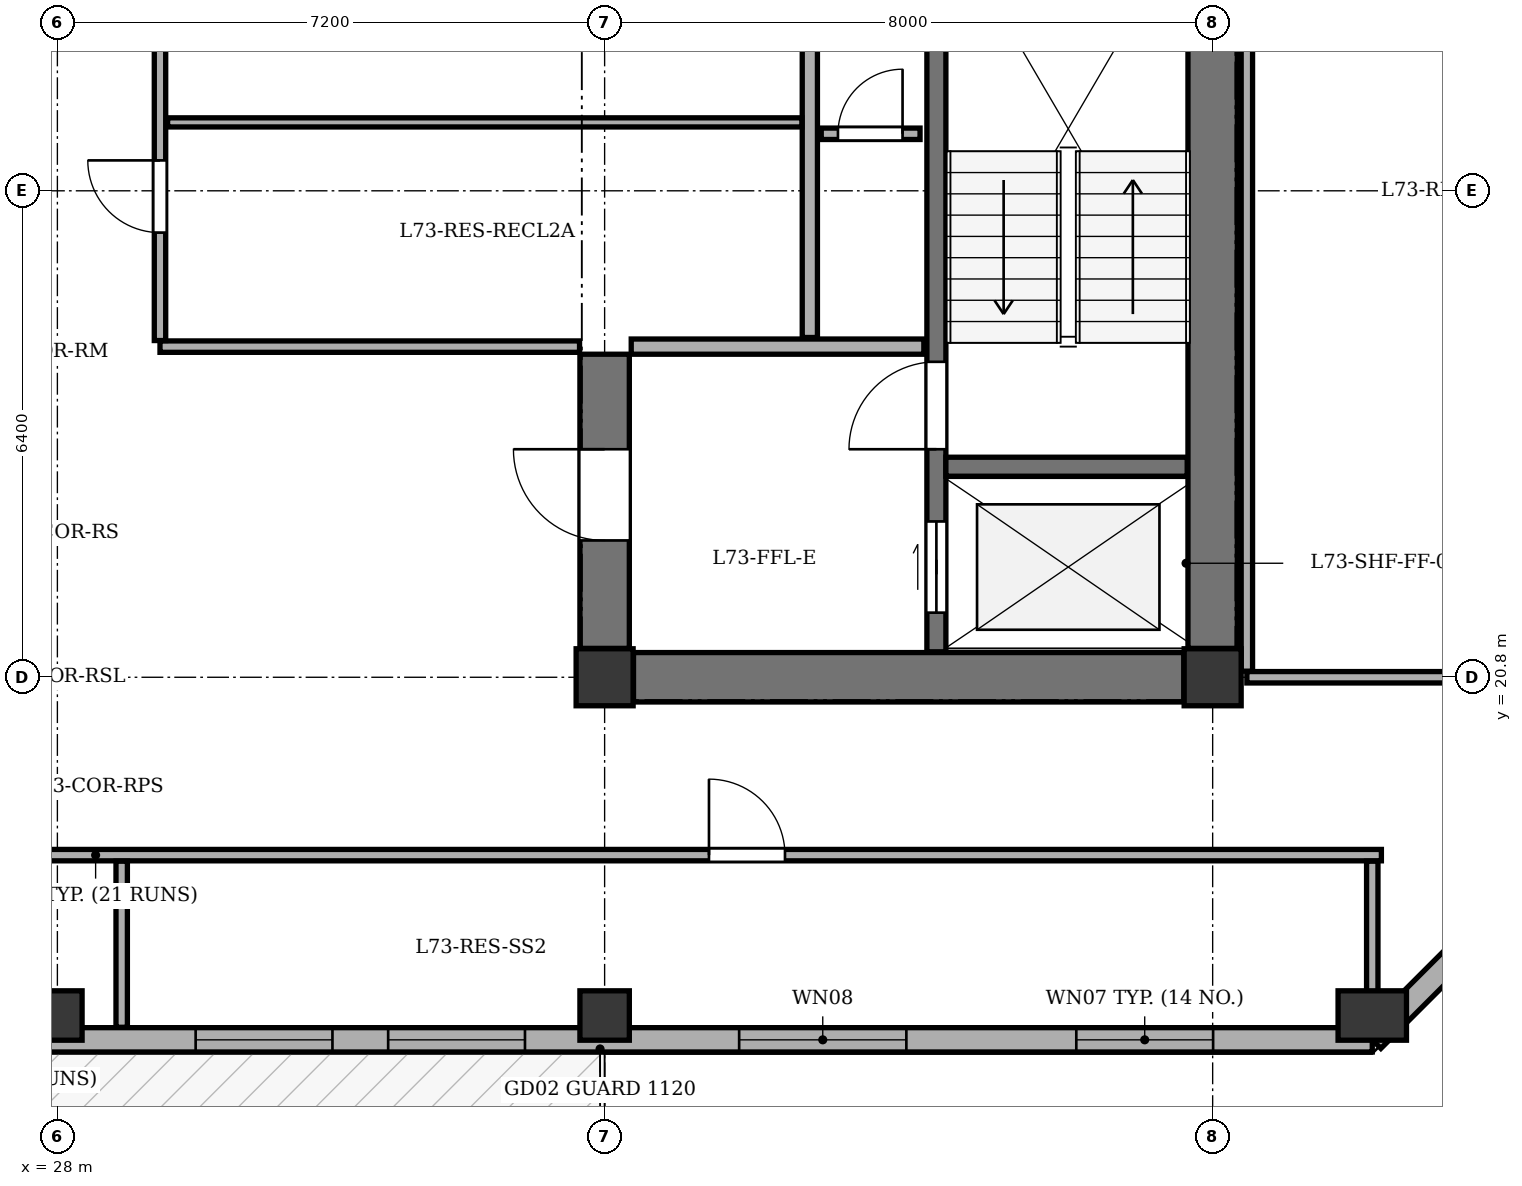
"""IFC4 building model, lengths in metres.
Left out: names, types, materials, properties, quantities, classifications, styles, units other than length and angle.
Written with IfcOpenShell. Run it as: python <this file> out.ifc"""

import sys

from ifc_helpers import new_model, si_unit, direction, frame, frame_2d, origin, origin_2d, place, context, subcontext, project, spatial, rectangle, extrude, element, fill, save


model = new_model("IFC4")
c1 = context("Model", 3, precision=1e-05, world=origin(), true_north=direction((0.0, 1.0)))
c2 = subcontext(c1, "Body", "Model", "MODEL_VIEW")
j1 = project(units=[si_unit("LENGTHUNIT", "METRE"), si_unit("PLANEANGLEUNIT", "RADIAN")], contexts=[c1])
p1 = place(None, origin())
s1 = spatial("IfcSite", under=j1, at=p1, CompositionType="ELEMENT")
p2 = place(p1, origin())
s2 = spatial("IfcBuilding", under=s1, at=p2, CompositionType="ELEMENT")
p3 = place(p2, frame((0.0, 0.0, 275.5)))
s3 = spatial("IfcBuildingStorey", under=s2, at=p3, CompositionType="ELEMENT", Elevation=275.5)
for number, where, z_axis, x_axis in (
    (1, (35.2, 20.8, 0.0), (0.0, 0.0, 1.0), (1.0, 0.0, 0.0)),
    (2, (43.2, 20.8, 0.0), (0.0, 0.0, 1.0), (1.0, 0.0, 0.0)),
):
    element("IfcColumn", number, at=place(p3, frame(where, z_axis=z_axis, x_axis=x_axis)), inside=s3, PredefinedType="COLUMN", context=c2, shape_type="SweptSolid", body=[
        extrude(rectangle(XDim=0.75, YDim=0.75, at=origin_2d()), origin(), (0.0, 0.0, 1.0), 3.4),
    ])
for number, where, z_axis, x_axis in (
    (3, (28.0, 16.35, 0.0), (0.0, 0.0, 1.0), (1.0, 0.0, 0.0)),
    (4, (35.2, 16.35, 0.0), (0.0, 0.0, 1.0), (1.0, 0.0, 0.0)),
):
    element("IfcColumn", number, at=place(p3, frame(where, z_axis=z_axis, x_axis=x_axis)), inside=s3, PredefinedType="COLUMN", context=c2, shape_type="SweptSolid", body=[
        extrude(rectangle(XDim=0.65, YDim=0.65, at=origin_2d()), origin(), (0.0, 0.0, 1.0), 3.4),
    ])
p4 = place(p3, frame((45.3, 16.35, 0.0), z_axis=(0.0, 0.0, 1.0), x_axis=(1.0, 0.0, 0.0)))
e5 = element("IfcColumn", 5, at=p4, inside=s3, PredefinedType="COLUMN", context=c2, shape_type="SweptSolid", body=[
    extrude(rectangle(XDim=0.65, YDim=0.9, at=origin_2d()), origin(), (0.0, 0.0, 1.0), 3.4),
])
p5 = place(p3, frame((45.3, 16.03, 0.0), z_axis=(0.0, 0.0, 1.0), x_axis=(-1.0, 0.0, 0.0)))
e6 = element("IfcWall", 6, at=p5, inside=s3, PredefinedType="STANDARD", context=c2, shape_type="SweptSolid", body=[
    extrude(rectangle(XDim=37.0, YDim=0.32, at=frame_2d((18.5, 0.0))), origin(), (0.0, 0.0, 1.0), 2.725),
])
p6 = place(p5, frame((20.6, 0.0, 0.0)))
e7 = element("IfcOpeningElement", 7, at=p6, cuts=e6, PredefinedType="OPENING", context=c2, shape_type="SweptSolid", body=[
    extrude(rectangle(XDim=1.0, YDim=2.02, at=frame_2d((0.5, 1.01))), frame((0.0, 0.17, 0.0), z_axis=(0.0, -1.0, 0.0), x_axis=(1.0, 0.0, 0.0)), (0.0, 0.0, 1.0), 0.34),
])
p7 = place(p5, frame((2.094, 0.0, 0.75)))
e8 = element("IfcOpeningElement", 8, at=p7, cuts=e6, PredefinedType="OPENING", context=c2, shape_type="SweptSolid", body=[
    extrude(rectangle(XDim=1.8, YDim=1.7, at=frame_2d((0.9, 0.85))), frame((0.0, 0.17, 0.0), z_axis=(0.0, -1.0, 0.0), x_axis=(1.0, 0.0, 0.0)), (0.0, 0.0, 1.0), 0.34),
])
p8 = place(p5, frame((6.13, 0.0, 0.75)))
e9 = element("IfcOpeningElement", 9, at=p8, cuts=e6, PredefinedType="OPENING", context=c2, shape_type="SweptSolid", body=[
    extrude(rectangle(XDim=2.2, YDim=1.7, at=frame_2d((1.1, 0.85))), frame((0.0, 0.17, 0.0), z_axis=(0.0, -1.0, 0.0), x_axis=(1.0, 0.0, 0.0)), (0.0, 0.0, 1.0), 0.34),
])
p9 = place(p5, frame((11.148, 0.0, 0.75)))
e10 = element("IfcOpeningElement", 10, at=p9, cuts=e6, PredefinedType="OPENING", context=c2, shape_type="SweptSolid", body=[
    extrude(rectangle(XDim=1.8, YDim=1.7, at=frame_2d((0.9, 0.85))), frame((0.0, 0.17, 0.0), z_axis=(0.0, -1.0, 0.0), x_axis=(1.0, 0.0, 0.0)), (0.0, 0.0, 1.0), 0.34),
])
p10 = place(p5, frame((13.681, 0.0, 0.75)))
e11 = element("IfcOpeningElement", 11, at=p10, cuts=e6, PredefinedType="OPENING", context=c2, shape_type="SweptSolid", body=[
    extrude(rectangle(XDim=1.8, YDim=1.7, at=frame_2d((0.9, 0.85))), frame((0.0, 0.17, 0.0), z_axis=(0.0, -1.0, 0.0), x_axis=(1.0, 0.0, 0.0)), (0.0, 0.0, 1.0), 0.34),
])
p11 = place(p5, frame((26.438, 0.0, 0.75)))
e12 = element("IfcOpeningElement", 12, at=p11, cuts=e6, PredefinedType="OPENING", context=c2, shape_type="SweptSolid", body=[
    extrude(rectangle(XDim=1.8, YDim=1.7, at=frame_2d((0.9, 0.85))), frame((0.0, 0.17, 0.0), z_axis=(0.0, -1.0, 0.0), x_axis=(1.0, 0.0, 0.0)), (0.0, 0.0, 1.0), 0.34),
])
p12 = place(p5, frame((30.417, 0.0, 0.75)))
e13 = element("IfcOpeningElement", 13, at=p12, cuts=e6, PredefinedType="OPENING", context=c2, shape_type="SweptSolid", body=[
    extrude(rectangle(XDim=2.2, YDim=1.7, at=frame_2d((1.1, 0.85))), frame((0.0, 0.17, 0.0), z_axis=(0.0, -1.0, 0.0), x_axis=(1.0, 0.0, 0.0)), (0.0, 0.0, 1.0), 0.34),
])
p13 = place(p3, frame((49.12, 19.85, 0.0), z_axis=(0.0, 0.0, 1.0), x_axis=(-0.707106781187, -0.707106781187, 0.0)))
e14 = element("IfcWall", 14, at=p13, inside=s3, PredefinedType="STANDARD", context=c2, shape_type="SweptSolid", body=[
    extrude(rectangle(XDim=5.402, YDim=0.32, at=frame_2d((2.701, 0.0))), origin(), (0.0, 0.0, 1.0), 2.725),
])
p14 = place(p13, frame((2.001, 0.0, 0.75)))
e15 = element("IfcOpeningElement", 15, at=p14, cuts=e14, PredefinedType="OPENING", context=c2, shape_type="SweptSolid", body=[
    extrude(rectangle(XDim=1.4, YDim=1.65, at=frame_2d((0.7, 0.825))), frame((0.0, 0.17, 0.0), z_axis=(0.0, -1.0, 0.0), x_axis=(1.0, 0.0, 0.0)), (0.0, 0.0, 1.0), 0.34),
])
p15 = place(p3, frame((43.2, 21.18, 0.0), z_axis=(0.0, 0.0, 1.0), x_axis=(0.0, 1.0, 0.0)))
e16 = element("IfcWall", 16, at=p15, inside=s3, PredefinedType="SHEAR", context=c2, shape_type="SweptSolid", body=[
    extrude(rectangle(XDim=12.04, YDim=0.65, at=frame_2d((6.02, 0.0))), origin(), (0.0, 0.0, 1.0), 3.1),
])
p16 = place(p3, frame((35.58, 20.8, 0.0), z_axis=(0.0, 0.0, 1.0), x_axis=(1.0, 0.0, 0.0)))
e17 = element("IfcWall", 17, at=p16, inside=s3, PredefinedType="SHEAR", context=c2, shape_type="SweptSolid", body=[
    extrude(rectangle(XDim=7.24, YDim=0.65, at=frame_2d((3.62, 0.0))), origin(), (0.0, 0.0, 1.0), 3.1),
])
p17 = place(p3, frame((35.2, 21.18, 0.0), z_axis=(0.0, 0.0, 1.0), x_axis=(0.0, 1.0, 0.0)))
e18 = element("IfcWall", 18, at=p17, inside=s3, PredefinedType="SHEAR", context=c2, shape_type="SweptSolid", body=[
    extrude(rectangle(XDim=3.87, YDim=0.65, at=frame_2d((1.935, 0.0))), origin(), (0.0, 0.0, 1.0), 3.1),
])
p18 = place(p17, frame((1.42, 0.0, 0.0)))
e19 = element("IfcOpeningElement", 19, at=p18, cuts=e18, PredefinedType="OPENING", context=c2, shape_type="SweptSolid", body=[
    extrude(rectangle(XDim=1.2, YDim=2.15, at=frame_2d((0.6, 1.075))), frame((0.0, 0.335, 0.0), z_axis=(0.0, -1.0, 0.0), x_axis=(1.0, 0.0, 0.0)), (0.0, 0.0, 1.0), 0.67),
])
p19 = place(p3, frame((39.565, 21.135, 0.0), z_axis=(0.0, 0.0, 1.0), x_axis=(0.0, 1.0, 0.0)))
e20 = element("IfcWall", 20, at=p19, inside=s3, PredefinedType="SHEAR", context=c2, shape_type="SweptSolid", body=[
    extrude(rectangle(XDim=12.13, YDim=0.25, at=frame_2d((6.065, 0.0))), origin(), (0.0, 0.0, 1.0), 3.1),
])
p20 = place(p19, frame((0.515, 0.0, 0.0)))
e21 = element("IfcOpeningElement", 21, at=p20, cuts=e20, PredefinedType="OPENING", context=c2, shape_type="SweptSolid", body=[
    extrude(rectangle(XDim=1.2, YDim=2.15, at=frame_2d((0.6, 1.075))), frame((0.0, 0.135, 0.0), z_axis=(0.0, -1.0, 0.0), x_axis=(1.0, 0.0, 0.0)), (0.0, 0.0, 1.0), 0.27),
])
p21 = place(p19, frame((2.665, 0.0, 0.0)))
e22 = element("IfcOpeningElement", 22, at=p21, cuts=e20, PredefinedType="OPENING", context=c2, shape_type="SweptSolid", body=[
    extrude(rectangle(XDim=1.15, YDim=2.15, at=frame_2d((0.575, 1.075))), frame((0.0, 0.135, 0.0), z_axis=(0.0, -1.0, 0.0), x_axis=(1.0, 0.0, 0.0)), (0.0, 0.0, 1.0), 0.27),
])
p22 = place(p3, frame((39.69, 23.57, 0.0), z_axis=(0.0, 0.0, 1.0), x_axis=(1.0, 0.0, 0.0)))
e23 = element("IfcWall", 23, at=p22, inside=s3, PredefinedType="SHEAR", context=c2, shape_type="SweptSolid", body=[
    extrude(rectangle(XDim=3.175, YDim=0.25, at=frame_2d((1.587, 0.0))), origin(), (0.0, 0.0, 1.0), 3.1),
])
p23 = place(p3, frame((35.55, 25.15, 0.0), z_axis=(0.0, 0.0, 1.0), x_axis=(1.0, 0.0, 0.0)))
e24 = element("IfcWall", 24, at=p23, inside=s3, PredefinedType="SOLIDWALL", context=c2, shape_type="SweptSolid", body=[
    extrude(rectangle(XDim=3.85, YDim=0.2, at=frame_2d((1.925, 0.0))), origin(), (0.0, 0.0, 1.0), 3.1),
])
p24 = place(p3, frame((37.9, 25.27, 0.0), z_axis=(0.0, 0.0, 1.0), x_axis=(0.0, 1.0, 0.0)))
e25 = element("IfcWall", 25, at=p24, inside=s3, PredefinedType="SOLIDWALL", context=c2, shape_type="SweptSolid", body=[
    extrude(rectangle(XDim=7.995, YDim=0.2, at=frame_2d((3.998, 0.0))), origin(), (0.0, 0.0, 1.0), 3.1),
])
p25 = place(p3, frame((38.05, 27.95, 0.0), z_axis=(0.0, 0.0, 1.0), x_axis=(1.0, 0.0, 0.0)))
e26 = element("IfcWall", 26, at=p25, inside=s3, PredefinedType="PARTITIONING", context=c2, shape_type="SweptSolid", body=[
    extrude(rectangle(XDim=1.3, YDim=0.15, at=frame_2d((0.65, 0.0))), origin(), (0.0, 0.0, 1.0), 3.1),
])
p26 = place(p25, frame((0.22, 0.0, 0.0)))
e27 = element("IfcOpeningElement", 27, at=p26, cuts=e26, PredefinedType="OPENING", context=c2, shape_type="SweptSolid", body=[
    extrude(rectangle(XDim=0.85, YDim=2.02, at=frame_2d((0.425, 1.01))), frame((0.0, 0.085, 0.0), z_axis=(0.0, -1.0, 0.0), x_axis=(1.0, 0.0, 0.0)), (0.0, 0.0, 1.0), 0.17),
])
p27 = place(p3, frame((29.35, 25.15, 0.0), z_axis=(0.0, 0.0, 1.0), x_axis=(1.0, 0.0, 0.0)))
e28 = element("IfcWall", 28, at=p27, inside=s3, PredefinedType="PARTITIONING", context=c2, shape_type="SweptSolid", body=[
    extrude(rectangle(XDim=5.52, YDim=0.15, at=frame_2d((2.76, 0.0))), origin(), (0.0, 0.0, 1.0), 3.1),
])
p28 = place(p3, frame((29.35, 25.23, 0.0), z_axis=(0.0, 0.0, 1.0), x_axis=(0.0, 1.0, 0.0)))
e29 = element("IfcWall", 29, at=p28, inside=s3, PredefinedType="PARTITIONING", context=c2, shape_type="SweptSolid", body=[
    extrude(rectangle(XDim=5.82, YDim=0.15, at=frame_2d((2.91, 0.0))), origin(), (0.0, 0.0, 1.0), 3.1),
])
p29 = place(p28, frame((1.42, 0.0, 0.0)))
e30 = element("IfcOpeningElement", 30, at=p29, cuts=e29, PredefinedType="OPENING", context=c2, shape_type="SweptSolid", body=[
    extrude(rectangle(XDim=0.95, YDim=2.1, at=frame_2d((0.475, 1.05))), frame((0.0, 0.085, 0.0), z_axis=(0.0, -1.0, 0.0), x_axis=(1.0, 0.0, 0.0)), (0.0, 0.0, 1.0), 0.17),
])
p30 = place(p28, frame((4.32, 0.0, 0.0)))
e31 = element("IfcOpeningElement", 31, at=p30, cuts=e29, PredefinedType="OPENING", context=c2, shape_type="SweptSolid", body=[
    extrude(rectangle(XDim=0.95, YDim=2.1, at=frame_2d((0.475, 1.05))), frame((0.0, 0.085, 0.0), z_axis=(0.0, -1.0, 0.0), x_axis=(1.0, 0.0, 0.0)), (0.0, 0.0, 1.0), 0.17),
])
p31 = place(p3, frame((29.45, 28.1, 0.0), z_axis=(0.0, 0.0, 1.0), x_axis=(1.0, 0.0, 0.0)))
e32 = element("IfcWall", 32, at=p31, inside=s3, PredefinedType="PARTITIONING", context=c2, shape_type="SweptSolid", body=[
    extrude(rectangle(XDim=8.345, YDim=0.12, at=frame_2d((4.172, 0.0))), origin(), (0.0, 0.0, 1.0), 3.1),
])
p32 = place(p3, frame((10.9, 18.46, 0.0), z_axis=(0.0, 0.0, 1.0), x_axis=(1.0, 0.0, 0.0)))
e33 = element("IfcWall", 33, at=p32, inside=s3, PredefinedType="PARTITIONING", context=c2, shape_type="SweptSolid", body=[
    extrude(rectangle(XDim=34.52, YDim=0.15, at=frame_2d((17.26, 0.0))), origin(), (0.0, 0.0, 1.0), 3.1),
])
p33 = place(p32, frame((8.533, 0.0, 0.0)))
e34 = element("IfcOpeningElement", 34, at=p33, cuts=e33, PredefinedType="OPENING", context=c2, shape_type="SweptSolid", body=[
    extrude(rectangle(XDim=1.0, YDim=2.1, at=frame_2d((0.5, 1.05))), frame((0.0, 0.085, 0.0), z_axis=(0.0, -1.0, 0.0), x_axis=(1.0, 0.0, 0.0)), (0.0, 0.0, 1.0), 0.17),
])
p34 = place(p32, frame((25.673, 0.0, 0.0)))
e35 = element("IfcOpeningElement", 35, at=p34, cuts=e33, PredefinedType="OPENING", context=c2, shape_type="SweptSolid", body=[
    extrude(rectangle(XDim=1.0, YDim=2.1, at=frame_2d((0.5, 1.05))), frame((0.0, 0.085, 0.0), z_axis=(0.0, -1.0, 0.0), x_axis=(1.0, 0.0, 0.0)), (0.0, 0.0, 1.0), 0.17),
])
for number, where, z_axis, x_axis in (
    (36, (28.846, 16.195, 0.0), (0.0, 0.0, 1.0), (0.0, 1.0, 0.0)),
    (37, (45.3, 16.195, 0.0), (0.0, 0.0, 1.0), (0.0, 1.0, 0.0)),
):
    element("IfcWall", number, at=place(p3, frame(where, z_axis=z_axis, x_axis=x_axis)), inside=s3, PredefinedType="PARTITIONING", context=c2, shape_type="SweptSolid", body=[
        extrude(rectangle(XDim=2.185, YDim=0.15, at=frame_2d((1.092, 0.0))), origin(), (0.0, 0.0, 1.0), 3.1),
    ])
p35 = place(p3, frame((43.65, 20.8, 0.0), z_axis=(0.0, 0.0, 1.0), x_axis=(1.0, 0.0, 0.0)))
e38 = element("IfcWall", 38, at=p35, inside=s3, PredefinedType="PARTITIONING", context=c2, shape_type="SweptSolid", body=[
    extrude(rectangle(XDim=5.305, YDim=0.15, at=frame_2d((2.653, 0.0))), origin(), (0.0, 0.0, 1.0), 2.535),
])
p36 = place(p3, frame((43.65, 20.88, 0.0), z_axis=(0.0, 0.0, 1.0), x_axis=(0.0, 1.0, 0.0)))
e39 = element("IfcWall", 39, at=p36, inside=s3, PredefinedType="PARTITIONING", context=c2, shape_type="SweptSolid", body=[
    extrude(rectangle(XDim=13.27, YDim=0.15, at=frame_2d((6.635, 0.0))), origin(), (0.0, 0.0, 1.0), 3.1),
])
p37 = place(p7, origin())
e40 = element("IfcWindow", 40, at=p37, inside=s3, PartitioningType="SINGLE_PANEL", PredefinedType="WINDOW", context=c2, shape_type="SweptSolid", body=[
    extrude(rectangle(XDim=1.8, YDim=1.7, at=frame_2d((0.9, 0.85))), frame((0.0, -0.01, 0.0), z_axis=(0.0, -1.0, 0.0), x_axis=(1.0, 0.0, 0.0)), (0.0, 0.0, 1.0), 0.06),
])
fill(e8, e40)
p38 = place(p8, origin())
e41 = element("IfcWindow", 41, at=p38, inside=s3, PartitioningType="SINGLE_PANEL", PredefinedType="WINDOW", context=c2, shape_type="SweptSolid", body=[
    extrude(rectangle(XDim=2.2, YDim=1.7, at=frame_2d((1.1, 0.85))), frame((0.0, -0.01, 0.0), z_axis=(0.0, -1.0, 0.0), x_axis=(1.0, 0.0, 0.0)), (0.0, 0.0, 1.0), 0.06),
])
fill(e9, e41)
p39 = place(p9, origin())
e42 = element("IfcWindow", 42, at=p39, inside=s3, PartitioningType="SINGLE_PANEL", PredefinedType="WINDOW", context=c2, shape_type="SweptSolid", body=[
    extrude(rectangle(XDim=1.8, YDim=1.7, at=frame_2d((0.9, 0.85))), frame((0.0, -0.01, 0.0), z_axis=(0.0, -1.0, 0.0), x_axis=(1.0, 0.0, 0.0)), (0.0, 0.0, 1.0), 0.06),
])
fill(e10, e42)
p40 = place(p10, origin())
e43 = element("IfcWindow", 43, at=p40, inside=s3, PartitioningType="SINGLE_PANEL", PredefinedType="WINDOW", context=c2, shape_type="SweptSolid", body=[
    extrude(rectangle(XDim=1.8, YDim=1.7, at=frame_2d((0.9, 0.85))), frame((0.0, -0.01, 0.0), z_axis=(0.0, -1.0, 0.0), x_axis=(1.0, 0.0, 0.0)), (0.0, 0.0, 1.0), 0.06),
])
fill(e11, e43)
p41 = place(p18, origin())
e44 = element("IfcDoor", 44, at=p41, inside=s3, OperationType="SINGLE_SWING_RIGHT", PredefinedType="DOOR", context=c2, shape_type="SweptSolid", body=[
    extrude(rectangle(XDim=1.2, YDim=2.15, at=frame_2d((0.6, 1.075))), frame((0.0, 0.025, 0.0), z_axis=(0.0, -1.0, 0.0), x_axis=(1.0, 0.0, 0.0)), (0.0, 0.0, 1.0), 0.05),
])
fill(e19, e44)
p42 = place(p20, origin())
e45 = element("IfcDoor", 45, at=p42, inside=s3, OperationType="DOUBLE_DOOR_SLIDING", PredefinedType="DOOR", context=c2, shape_type="SweptSolid", body=[
    extrude(rectangle(XDim=1.2, YDim=2.15, at=frame_2d((0.6, 1.075))), frame((0.0, 0.025, 0.0), z_axis=(0.0, -1.0, 0.0), x_axis=(1.0, 0.0, 0.0)), (0.0, 0.0, 1.0), 0.05),
])
fill(e21, e45)
p43 = place(p21, origin())
e46 = element("IfcDoor", 46, at=p43, inside=s3, OperationType="SINGLE_SWING_LEFT", PredefinedType="DOOR", context=c2, shape_type="SweptSolid", body=[
    extrude(rectangle(XDim=1.15, YDim=2.15, at=frame_2d((0.575, 1.075))), frame((0.0, 0.025, 0.0), z_axis=(0.0, -1.0, 0.0), x_axis=(1.0, 0.0, 0.0)), (0.0, 0.0, 1.0), 0.05),
])
fill(e22, e46)
p44 = place(p26, origin())
e47 = element("IfcDoor", 47, at=p44, inside=s3, OperationType="SINGLE_SWING_RIGHT", PredefinedType="DOOR", context=c2, shape_type="SweptSolid", body=[
    extrude(rectangle(XDim=0.85, YDim=2.02, at=frame_2d((0.425, 1.01))), frame((0.0, 0.025, 0.0), z_axis=(0.0, -1.0, 0.0), x_axis=(1.0, 0.0, 0.0)), (0.0, 0.0, 1.0), 0.05),
])
fill(e27, e47)
p45 = place(p29, origin())
e48 = element("IfcDoor", 48, at=p45, inside=s3, OperationType="SINGLE_SWING_RIGHT", PredefinedType="DOOR", context=c2, shape_type="SweptSolid", body=[
    extrude(rectangle(XDim=0.95, YDim=2.1, at=frame_2d((0.475, 1.05))), frame((0.0, 0.025, 0.0), z_axis=(0.0, -1.0, 0.0), x_axis=(1.0, 0.0, 0.0)), (0.0, 0.0, 1.0), 0.05),
])
fill(e30, e48)
p46 = place(p34, origin())
e49 = element("IfcDoor", 49, at=p46, inside=s3, OperationType="SINGLE_SWING_LEFT", PredefinedType="DOOR", context=c2, shape_type="SweptSolid", body=[
    extrude(rectangle(XDim=1.0, YDim=2.1, at=frame_2d((0.5, 1.05))), frame((0.0, 0.025, 0.0), z_axis=(0.0, -1.0, 0.0), x_axis=(1.0, 0.0, 0.0)), (0.0, 0.0, 1.0), 0.05),
])
fill(e35, e49)
save(model, sys.argv[1])
